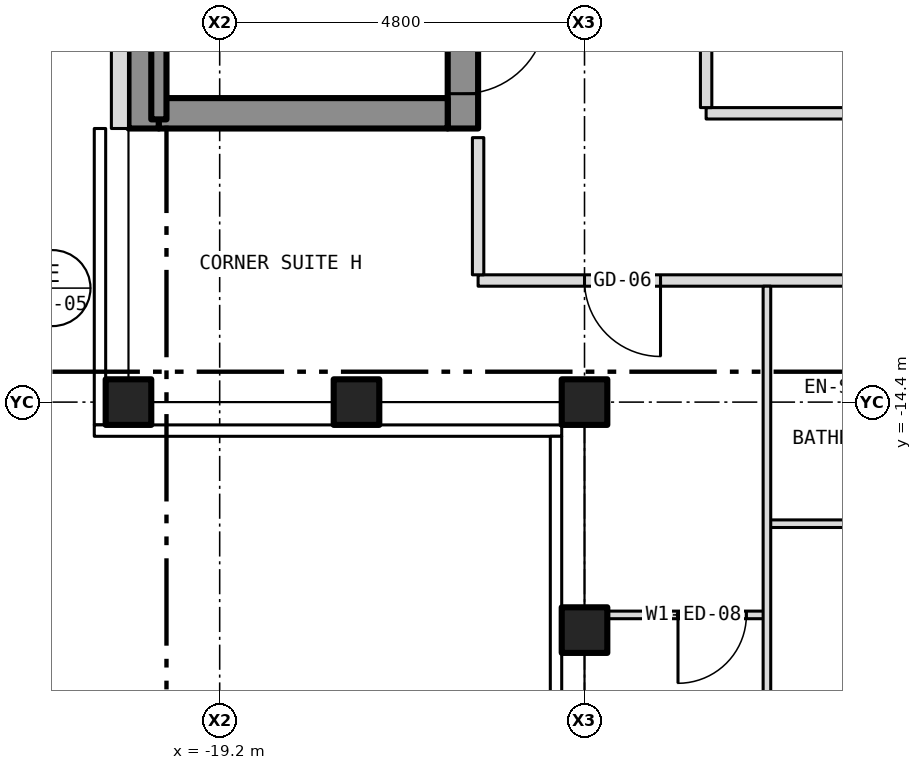
"""IFC4 building model, lengths in metres.
Left out: names, types, materials, properties, quantities, classifications, styles, units other than length and angle.
Written with IfcOpenShell. Run it as: python <this file> out.ifc"""

import sys

from ifc_helpers import new_model, si_unit, direction, frame, frame_2d, origin, origin_2d, place, context, subcontext, project, spatial, rectangle, hollow_rectangle, extrude, element, fill, save


model = new_model("IFC4")
c1 = context("Model", 3, precision=1e-05, world=origin(), true_north=direction((0.0, 1.0)))
c2 = subcontext(c1, "Body", "Model", "MODEL_VIEW")
j1 = project(units=[si_unit("LENGTHUNIT", "METRE"), si_unit("PLANEANGLEUNIT", "RADIAN")], contexts=[c1])
p1 = place(None, origin())
s1 = spatial("IfcSite", under=j1, at=p1, CompositionType="ELEMENT")
p2 = place(p1, origin())
s2 = spatial("IfcBuilding", under=s1, at=p2, CompositionType="ELEMENT")
p3 = place(p2, frame((0.0, 0.0, 258.5)))
s3 = spatial("IfcBuildingStorey", under=s2, at=p3, CompositionType="ELEMENT", Elevation=258.5)
for number, where, z_axis, x_axis in (
    (1, (-20.4, -14.4, -0.15), (0.0, 0.0, 1.0), (1.0, 0.0, 0.0)),
    (2, (-14.4, -14.4, -0.15), (0.0, 0.0, 1.0), (1.0, 0.0, 0.0)),
    (3, (-14.4, -17.4, -0.15), (0.0, 0.0, 1.0), (1.0, 0.0, 0.0)),
    (4, (-17.4, -14.4, -0.15), (0.0, 0.0, 1.0), (1.0, 0.0, 0.0)),
):
    element("IfcColumn", number, at=place(p3, frame(where, z_axis=z_axis, x_axis=x_axis)), inside=s3, PredefinedType="COLUMN", context=c2, shape_type="SweptSolid", body=[
        extrude(hollow_rectangle(XDim=0.6, YDim=0.6, WallThickness=0.03, at=origin_2d()), origin(), (0.0, 0.0, 1.0), 3.5),
    ])
p4 = place(p3, frame((-16.0, -10.8, 0.0), z_axis=(0.0, 0.0, 1.0), x_axis=(0.0, 1.0, 0.0)))
e5 = element("IfcWall", 5, at=p4, inside=s3, PredefinedType="SHEAR", context=c2, shape_type="SweptSolid", body=[
    extrude(rectangle(XDim=21.6, YDim=0.4, at=frame_2d((10.8, 0.0))), origin(), (0.0, 0.0, 1.0), 3.25),
])
p5 = place(p4, frame((9.4, 0.0, 0.0)))
e6 = element("IfcOpeningElement", 6, at=p5, cuts=e5, PredefinedType="OPENING", context=c2, shape_type="SweptSolid", body=[
    extrude(rectangle(XDim=1.1, YDim=2.1, at=frame_2d((0.55, 1.05))), frame((0.0, 0.212, 0.0), z_axis=(0.0, -1.0, 0.0), x_axis=(1.0, 0.0, 0.0)), (0.0, 0.0, 1.0), 0.424),
])
p6 = place(p4, frame((11.5, 0.0, 0.0)))
e7 = element("IfcOpeningElement", 7, at=p6, cuts=e5, PredefinedType="OPENING", context=c2, shape_type="SweptSolid", body=[
    extrude(rectangle(XDim=1.1, YDim=2.1, at=frame_2d((0.55, 1.05))), frame((0.0, 0.212, 0.0), z_axis=(0.0, -1.0, 0.0), x_axis=(1.0, 0.0, 0.0)), (0.0, 0.0, 1.0), 0.424),
])
p7 = place(p4, frame((13.6, 0.0, 0.0)))
e8 = element("IfcOpeningElement", 8, at=p7, cuts=e5, PredefinedType="OPENING", context=c2, shape_type="SweptSolid", body=[
    extrude(rectangle(XDim=1.1, YDim=2.1, at=frame_2d((0.55, 1.05))), frame((0.0, 0.212, 0.0), z_axis=(0.0, -1.0, 0.0), x_axis=(1.0, 0.0, 0.0)), (0.0, 0.0, 1.0), 0.424),
])
p8 = place(p4, frame((15.7, 0.0, 0.0)))
e9 = element("IfcOpeningElement", 9, at=p8, cuts=e5, PredefinedType="OPENING", context=c2, shape_type="SweptSolid", body=[
    extrude(rectangle(XDim=1.1, YDim=2.1, at=frame_2d((0.55, 1.05))), frame((0.0, 0.212, 0.0), z_axis=(0.0, -1.0, 0.0), x_axis=(1.0, 0.0, 0.0)), (0.0, 0.0, 1.0), 0.424),
])
p9 = place(p4, frame((17.8, 0.0, 0.0)))
e10 = element("IfcOpeningElement", 10, at=p9, cuts=e5, PredefinedType="OPENING", context=c2, shape_type="SweptSolid", body=[
    extrude(rectangle(XDim=1.1, YDim=2.1, at=frame_2d((0.55, 1.05))), frame((0.0, 0.212, 0.0), z_axis=(0.0, -1.0, 0.0), x_axis=(1.0, 0.0, 0.0)), (0.0, 0.0, 1.0), 0.424),
])
p10 = place(p4, frame((0.458, 0.0, 0.0)))
e11 = element("IfcOpeningElement", 11, at=p10, cuts=e5, PredefinedType="OPENING", context=c2, shape_type="SweptSolid", body=[
    extrude(rectangle(XDim=1.1, YDim=2.1, at=frame_2d((0.55, 1.05))), frame((0.0, 0.212, 0.0), z_axis=(0.0, -1.0, 0.0), x_axis=(1.0, 0.0, 0.0)), (0.0, 0.0, 1.0), 0.424),
])
p11 = place(p4, frame((7.5, 0.0, 0.0)))
e12 = element("IfcOpeningElement", 12, at=p11, cuts=e5, PredefinedType="OPENING", context=c2, shape_type="SweptSolid", body=[
    extrude(rectangle(XDim=1.1, YDim=2.1, at=frame_2d((0.55, 1.05))), frame((0.0, 0.212, 0.0), z_axis=(0.0, -1.0, 0.0), x_axis=(1.0, 0.0, 0.0)), (0.0, 0.0, 1.0), 0.424),
])
p12 = place(p4, frame((20.0, 0.0, 0.0)))
e13 = element("IfcOpeningElement", 13, at=p12, cuts=e5, PredefinedType="OPENING", context=c2, shape_type="SweptSolid", body=[
    extrude(rectangle(XDim=0.9, YDim=2.1, at=frame_2d((0.45, 1.05))), frame((0.0, 0.212, 0.0), z_axis=(0.0, -1.0, 0.0), x_axis=(1.0, 0.0, 0.0)), (0.0, 0.0, 1.0), 0.424),
])
p13 = place(p3, frame((-20.2, -10.8, 0.0), z_axis=(0.0, 0.0, 1.0), x_axis=(0.0, 1.0, 0.0)))
e14 = element("IfcWall", 14, at=p13, inside=s3, PredefinedType="SHEAR", context=c2, shape_type="SweptSolid", body=[
    extrude(rectangle(XDim=21.6, YDim=0.4, at=frame_2d((10.8, 0.0))), origin(), (0.0, 0.0, 1.0), 3.25),
])
p14 = place(p3, frame((-20.0, -10.6, 0.0), z_axis=(0.0, 0.0, 1.0), x_axis=(1.0, 0.0, 0.0)))
e15 = element("IfcWall", 15, at=p14, inside=s3, PredefinedType="SHEAR", context=c2, shape_type="SweptSolid", body=[
    extrude(rectangle(XDim=3.8, YDim=0.4, at=frame_2d((1.9, 0.0))), origin(), (0.0, 0.0, 1.0), 3.25),
])
p15 = place(p3, frame((-20.512, 10.8, 0.0), z_axis=(0.0, 0.0, 1.0), x_axis=(0.0, -1.0, 0.0)))
e16 = element("IfcWall", 16, at=p15, inside=s3, PredefinedType="SOLIDWALL", context=c2, shape_type="SweptSolid", body=[
    extrude(rectangle(XDim=21.6, YDim=0.225, at=frame_2d((10.8, 0.0))), origin(), (0.0, 0.0, 1.0), 3.5),
])
p16 = place(p15, frame((18.05, 0.0, 1.0)))
e17 = element("IfcOpeningElement", 17, at=p16, cuts=e16, PredefinedType="OPENING", context=c2, shape_type="SweptSolid", body=[
    extrude(rectangle(XDim=0.6, YDim=1.5, at=frame_2d((0.3, 0.75))), frame((0.0, 0.125, 0.0), z_axis=(0.0, -1.0, 0.0), x_axis=(1.0, 0.0, 0.0)), (0.0, 0.0, 1.0), 0.249),
])
p17 = place(p3, frame((-14.28, -17.2, 0.0), z_axis=(0.0, 0.0, 1.0), x_axis=(1.0, 0.0, 0.0)))
e18 = element("IfcWall", 18, at=p17, inside=s3, PredefinedType="PARTITIONING", context=c2, shape_type="SweptSolid", body=[
    extrude(rectangle(XDim=2.28, YDim=0.1, at=frame_2d((1.14, 0.0))), origin(), (0.0, 0.0, 1.0), 3.35),
])
p18 = place(p17, frame((1.11, 0.0, 0.0)))
e19 = element("IfcOpeningElement", 19, at=p18, cuts=e18, PredefinedType="OPENING", context=c2, shape_type="SweptSolid", body=[
    extrude(rectangle(XDim=0.9, YDim=2.1, at=frame_2d((0.45, 1.05))), frame((0.0, 0.062, 0.0), z_axis=(0.0, -1.0, 0.0), x_axis=(1.0, 0.0, 0.0)), (0.0, 0.0, 1.0), 0.124),
])
p19 = place(p3, frame((-12.0, -16.0, 0.0), z_axis=(0.0, 0.0, 1.0), x_axis=(1.0, 0.0, 0.0)))
e20 = element("IfcWall", 20, at=p19, inside=s3, PredefinedType="PARTITIONING", context=c2, shape_type="SweptSolid", body=[
    extrude(rectangle(XDim=2.2, YDim=0.1, at=frame_2d((1.1, 0.0))), origin(), (0.0, 0.0, 1.0), 3.35),
])
p20 = place(p3, frame((-15.8, -12.8, 0.0), z_axis=(0.0, 0.0, 1.0), x_axis=(1.0, 0.0, 0.0)))
e21 = element("IfcWall", 21, at=p20, inside=s3, PredefinedType="PARTITIONING", context=c2, shape_type="SweptSolid", body=[
    extrude(rectangle(XDim=31.6, YDim=0.15, at=frame_2d((15.8, 0.0))), origin(), (0.0, 0.0, 1.0), 3.35),
])
p21 = place(p20, frame((6.8, 0.0, 0.0)))
e22 = element("IfcOpeningElement", 22, at=p21, cuts=e21, PredefinedType="OPENING", context=c2, shape_type="SweptSolid", body=[
    extrude(rectangle(XDim=1.0, YDim=2.1, at=frame_2d((0.5, 1.05))), frame((0.0, 0.087, 0.0), z_axis=(0.0, -1.0, 0.0), x_axis=(1.0, 0.0, 0.0)), (0.0, 0.0, 1.0), 0.174),
])
p22 = place(p20, frame((15.35, 0.0, 0.0)))
e23 = element("IfcOpeningElement", 23, at=p22, cuts=e21, PredefinedType="OPENING", context=c2, shape_type="SweptSolid", body=[
    extrude(rectangle(XDim=0.9, YDim=2.1, at=frame_2d((0.45, 1.05))), frame((0.0, 0.087, 0.0), z_axis=(0.0, -1.0, 0.0), x_axis=(1.0, 0.0, 0.0)), (0.0, 0.0, 1.0), 0.174),
])
p23 = place(p20, frame((24.95, 0.0, 0.0)))
e24 = element("IfcOpeningElement", 24, at=p23, cuts=e21, PredefinedType="OPENING", context=c2, shape_type="SweptSolid", body=[
    extrude(rectangle(XDim=0.9, YDim=2.1, at=frame_2d((0.45, 1.05))), frame((0.0, 0.087, 0.0), z_axis=(0.0, -1.0, 0.0), x_axis=(1.0, 0.0, 0.0)), (0.0, 0.0, 1.0), 0.174),
])
p24 = place(p20, frame((1.4, 0.0, 0.0)))
e25 = element("IfcOpeningElement", 25, at=p24, cuts=e21, PredefinedType="OPENING", context=c2, shape_type="SweptSolid", body=[
    extrude(rectangle(XDim=1.0, YDim=2.1, at=frame_2d((0.5, 1.05))), frame((0.0, 0.087, 0.0), z_axis=(0.0, -1.0, 0.0), x_axis=(1.0, 0.0, 0.0)), (0.0, 0.0, 1.0), 0.174),
])
p25 = place(p20, frame((29.2, 0.0, 0.0)))
e26 = element("IfcOpeningElement", 26, at=p25, cuts=e21, PredefinedType="OPENING", context=c2, shape_type="SweptSolid", body=[
    extrude(rectangle(XDim=1.0, YDim=2.1, at=frame_2d((0.5, 1.05))), frame((0.0, 0.087, 0.0), z_axis=(0.0, -1.0, 0.0), x_axis=(1.0, 0.0, 0.0)), (0.0, 0.0, 1.0), 0.174),
])
p26 = place(p3, frame((-12.8, -10.6, 0.0), z_axis=(0.0, 0.0, 1.0), x_axis=(1.0, 0.0, 0.0)))
e27 = element("IfcWall", 27, at=p26, inside=s3, PredefinedType="PARTITIONING", context=c2, shape_type="SweptSolid", body=[
    extrude(rectangle(XDim=18.7, YDim=0.15, at=frame_2d((9.35, 0.0))), origin(), (0.0, 0.0, 1.0), 3.35),
])
p27 = place(p26, frame((8.9, 0.0, 0.0)))
e28 = element("IfcOpeningElement", 28, at=p27, cuts=e27, PredefinedType="OPENING", context=c2, shape_type="SweptSolid", body=[
    extrude(rectangle(XDim=0.9, YDim=2.1, at=frame_2d((0.45, 1.05))), frame((0.0, 0.087, 0.0), z_axis=(0.0, -1.0, 0.0), x_axis=(1.0, 0.0, 0.0)), (0.0, 0.0, 1.0), 0.174),
])
p28 = place(p3, frame((-20.0, -10.68, 0.0), z_axis=(0.0, 0.0, 1.0), x_axis=(0.0, 1.0, 0.0)))
e29 = element("IfcWall", 29, at=p28, inside=s3, PredefinedType="SHEAR", context=c2, shape_type="SweptSolid", body=[
    extrude(rectangle(XDim=6.98, YDim=0.2, at=frame_2d((3.49, 0.0))), origin(), (0.0, 0.0, 1.0), 3.25),
])
p29 = place(p3, frame((-15.8, -12.725, 0.0), z_axis=(0.0, 0.0, 1.0), x_axis=(0.0, 1.0, 0.0)))
e30 = element("IfcWall", 30, at=p29, inside=s3, PredefinedType="PARTITIONING", context=c2, shape_type="SweptSolid", body=[
    extrude(rectangle(XDim=1.805, YDim=0.15, at=frame_2d((0.903, 0.0))), origin(), (0.0, 0.0, 1.0), 3.35),
])
p30 = place(p3, frame((-12.8, -10.525, 0.0), z_axis=(0.0, 0.0, 1.0), x_axis=(0.0, 1.0, 0.0)))
e31 = element("IfcWall", 31, at=p30, inside=s3, PredefinedType="PARTITIONING", context=c2, shape_type="SweptSolid", body=[
    extrude(rectangle(XDim=8.525, YDim=0.15, at=frame_2d((4.262, 0.0))), origin(), (0.0, 0.0, 1.0), 3.35),
])
p31 = place(p3, frame((-12.0, -20.73, 0.0), z_axis=(0.0, 0.0, 1.0), x_axis=(0.0, 1.0, 0.0)))
e32 = element("IfcWall", 32, at=p31, inside=s3, PredefinedType="PARTITIONING", context=c2, shape_type="SweptSolid", body=[
    extrude(rectangle(XDim=7.855, YDim=0.1, at=frame_2d((3.927, 0.0))), origin(), (0.0, 0.0, 1.0), 3.35),
])
p32 = place(p10, origin())
e33 = element("IfcDoor", 33, at=p32, inside=s3, OperationType="SINGLE_SWING_RIGHT", PredefinedType="DOOR", context=c2, shape_type="SweptSolid", body=[
    extrude(rectangle(XDim=1.1, YDim=2.1, at=frame_2d((0.55, 1.05))), frame((0.0, 0.025, 0.0), z_axis=(0.0, -1.0, 0.0), x_axis=(1.0, 0.0, 0.0)), (0.0, 0.0, 1.0), 0.05),
])
fill(e11, e33)
p33 = place(p18, origin())
e34 = element("IfcDoor", 34, at=p33, inside=s3, OperationType="SINGLE_SWING_LEFT", PredefinedType="DOOR", context=c2, shape_type="SweptSolid", body=[
    extrude(rectangle(XDim=0.9, YDim=2.1, at=frame_2d((0.45, 1.05))), frame((0.0, 0.025, 0.0), z_axis=(0.0, -1.0, 0.0), x_axis=(1.0, 0.0, 0.0)), (0.0, 0.0, 1.0), 0.05),
])
fill(e19, e34)
p34 = place(p24, origin())
e35 = element("IfcDoor", 35, at=p34, inside=s3, OperationType="SINGLE_SWING_RIGHT", PredefinedType="DOOR", context=c2, shape_type="SweptSolid", body=[
    extrude(rectangle(XDim=1.0, YDim=2.1, at=frame_2d((0.5, 1.05))), frame((0.0, 0.025, 0.0), z_axis=(0.0, -1.0, 0.0), x_axis=(1.0, 0.0, 0.0)), (0.0, 0.0, 1.0), 0.05),
])
fill(e25, e35)
save(model, sys.argv[1])
